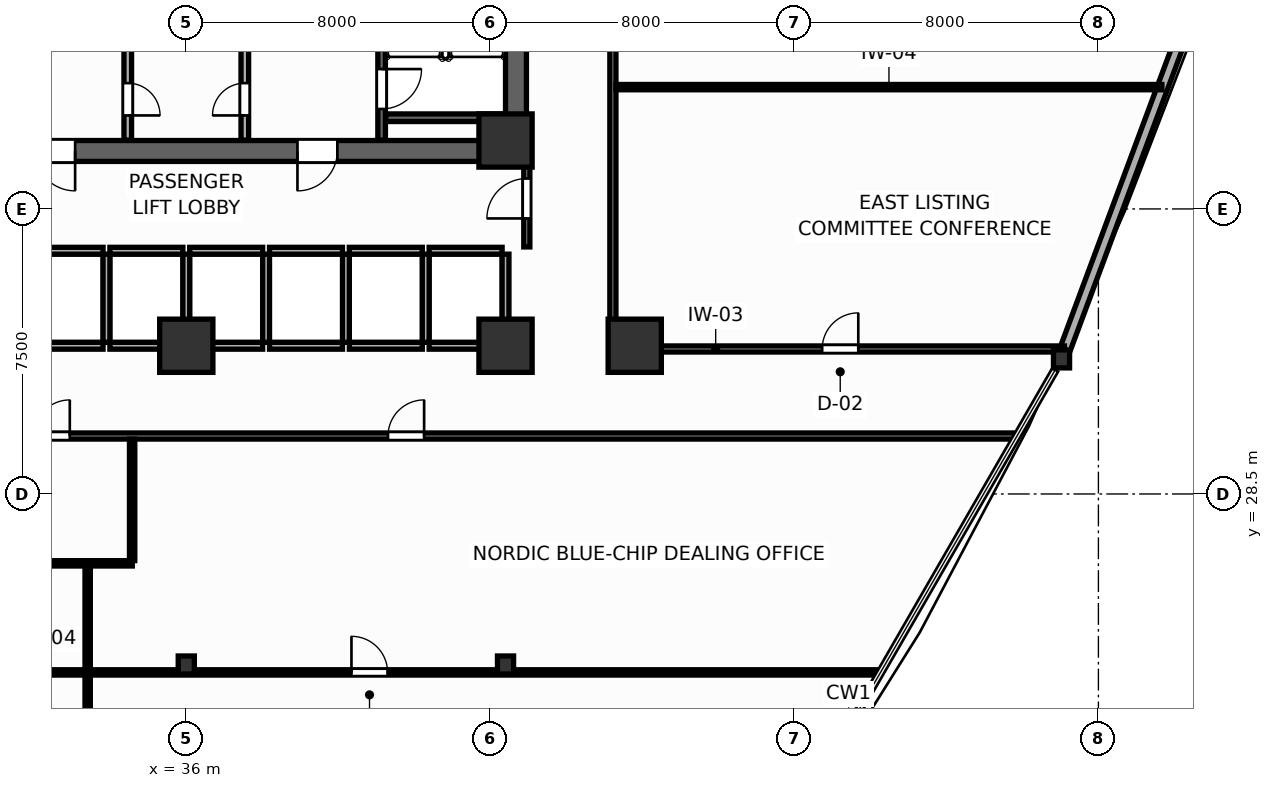
"""IFC4 building model, lengths in metres.
Left out: names, types, materials, properties, quantities, classifications, styles, units other than length and angle.
Written with IfcOpenShell. Run it as: python <this file> out.ifc"""

import sys

from ifc_helpers import new_model, si_unit, direction, frame, frame_2d, origin, origin_2d, place, context, subcontext, project, spatial, rectangle, i_section, extrude, source, transform, mapped, element, fill, save


model = new_model("IFC4")
c1 = context("Model", 3, precision=1e-05, world=origin(), true_north=direction((0.0, 1.0)))
c2 = subcontext(c1, "Body", "Model", "MODEL_VIEW")
j1 = project(units=[si_unit("LENGTHUNIT", "METRE"), si_unit("PLANEANGLEUNIT", "RADIAN")], contexts=[c1])
p1 = place(None, origin())
s1 = spatial("IfcSite", under=j1, at=p1, CompositionType="ELEMENT")
p2 = place(p1, origin())
s2 = spatial("IfcBuilding", under=s1, at=p2, CompositionType="ELEMENT")
p3 = place(p2, frame((0.0, 0.0, 27.9)))
s3 = spatial("IfcBuildingStorey", under=s2, at=p3, CompositionType="ELEMENT", Elevation=27.9)
p4 = place(p3, frame((27.05, 37.525, 0.0), z_axis=(0.0, 0.0, 1.0), x_axis=(1.0, 0.0, 0.0)))
e1 = element("IfcWall", 1, at=p4, inside=s3, PredefinedType="SHEAR", context=c2, shape_type="SweptSolid", body=[
    extrude(rectangle(XDim=17.9, YDim=0.55, at=frame_2d((8.95, 0.0))), origin(), (0.0, 0.0, 1.0), 3.9),
])
p5 = place(p4, frame((4.975, 0.0, 0.0)))
e2 = element("IfcOpeningElement", 2, at=p5, cuts=e1, PredefinedType="OPENING", context=c2, shape_type="SweptSolid", body=[
    extrude(rectangle(XDim=1.05, YDim=2.1, at=frame_2d((0.525, 1.05))), frame((0.0, 0.285, 0.0), z_axis=(0.0, -1.0, 0.0), x_axis=(1.0, 0.0, 0.0)), (0.0, 0.0, 1.0), 0.57),
])
p6 = place(p4, frame((11.875, 0.0, 0.0)))
e3 = element("IfcOpeningElement", 3, at=p6, cuts=e1, PredefinedType="OPENING", context=c2, shape_type="SweptSolid", body=[
    extrude(rectangle(XDim=1.05, YDim=2.1, at=frame_2d((0.525, 1.05))), frame((0.0, 0.285, 0.0), z_axis=(0.0, -1.0, 0.0), x_axis=(1.0, 0.0, 0.0)), (0.0, 0.0, 1.0), 0.57),
])
p7 = place(p3, frame((44.675, 37.8, 0.0), z_axis=(0.0, 0.0, 1.0), x_axis=(0.0, 1.0, 0.0)))
e4 = element("IfcWall", 4, at=p7, inside=s3, PredefinedType="SHEAR", context=c2, shape_type="SweptSolid", body=[
    extrude(rectangle(XDim=9.0, YDim=0.55, at=frame_2d((4.5, 0.0))), origin(), (0.0, 0.0, 1.0), 3.9),
])
m1 = source(origin(), c2, "Body", "SweptSolid", [
    extrude(rectangle(XDim=1.4, YDim=1.4, at=origin_2d()), origin(), (0.0, 0.0, 1.0), 3.9),
])
for number, where, z_axis, x_axis in (
    (5, (44.4, 37.8, 0.0), (0.0, 0.0, 1.0), (1.0, 0.0, 0.0)),
    (6, (44.4, 32.4, 0.0), (0.0, 0.0, 1.0), (1.0, 0.0, 0.0)),
    (7, (36.0, 32.4, 0.0), (0.0, 0.0, 1.0), (1.0, 0.0, 0.0)),
    (8, (47.8, 32.4, 0.0), (0.0, 0.0, 1.0), (1.0, 0.0, 0.0)),
):
    element("IfcColumn", number, at=place(p3, frame(where, z_axis=z_axis, x_axis=x_axis)), inside=s3, PredefinedType="COLUMN", context=c2, shape_type="MappedRepresentation", body=[
        mapped(m1, transform((0.0, 0.0, 0.0), scale=1.0)),
    ])
m2 = source(origin(), c2, "Body", "SweptSolid", [
    extrude(i_section(OverallWidth=0.424, OverallDepth=0.474, WebThickness=0.045, FlangeThickness=0.072, FilletRadius=0.015, at=origin_2d()), origin(), (0.0, 0.0, 1.0), 3.9),
])
for number, where, z_axis, x_axis in (
    (9, (44.4, 24.0, 0.0), (0.0, 0.0, 1.0), (1.0, 0.0, 0.0)),
    (10, (36.0, 24.0, 0.0), (0.0, 0.0, 1.0), (1.0, 0.0, 0.0)),
    (11, (59.03, 32.054, 0.0), (0.0, 0.0, 1.0), (1.0, 0.0, 0.0)),
):
    element("IfcColumn", number, at=place(p3, frame(where, z_axis=z_axis, x_axis=x_axis)), inside=s3, PredefinedType="COLUMN", context=c2, shape_type="MappedRepresentation", body=[
        mapped(m2, transform((0.0, 0.0, 0.0), scale=1.0)),
    ])
p8 = place(p3, frame((59.12, 32.296, 0.0), z_axis=(0.0, 0.0, 1.0), x_axis=(0.348763587367, 0.937210734108, 0.0)))
e12 = element("IfcWall", 12, at=p8, inside=s3, PredefinedType="SOLIDWALL", context=c2, shape_type="SweptSolid", body=[
    extrude(rectangle(XDim=18.863, YDim=0.28, at=frame_2d((9.432, 0.0))), origin(), (0.0, 0.0, 1.0), 3.23),
])
p9 = place(p3, frame((41.14, 37.81, 0.0), z_axis=(0.0, 0.0, 1.0), x_axis=(0.0, 1.0, 0.0)))
e13 = element("IfcWall", 13, at=p9, inside=s3, PredefinedType="SHEAR", context=c2, shape_type="SweptSolid", body=[
    extrude(rectangle(XDim=8.98, YDim=0.2, at=frame_2d((4.49, 0.0))), origin(), (0.0, 0.0, 1.0), 3.9),
])
p10 = place(p9, frame((0.82, 0.0, 0.0)))
e14 = element("IfcOpeningElement", 14, at=p10, cuts=e13, PredefinedType="OPENING", context=c2, shape_type="SweptSolid", body=[
    extrude(rectangle(XDim=1.05, YDim=2.1, at=frame_2d((0.525, 1.05))), frame((0.0, 0.11, 0.0), z_axis=(0.0, -1.0, 0.0), x_axis=(1.0, 0.0, 0.0)), (0.0, 0.0, 1.0), 0.22),
])
p11 = place(p3, frame((41.25, 38.4, 0.0), z_axis=(0.0, 0.0, 1.0), x_axis=(1.0, 0.0, 0.0)))
e15 = element("IfcWall", 15, at=p11, inside=s3, PredefinedType="SHEAR", context=c2, shape_type="SweptSolid", body=[
    extrude(rectangle(XDim=3.14, YDim=0.2, at=frame_2d((1.57, 0.0))), origin(), (0.0, 0.0, 1.0), 3.9),
])
p12 = place(p3, frame((34.46, 37.81, 0.0), z_axis=(0.0, 0.0, 1.0), x_axis=(0.0, 1.0, 0.0)))
e16 = element("IfcWall", 16, at=p12, inside=s3, PredefinedType="PARTITIONING", context=c2, shape_type="SweptSolid", body=[
    extrude(rectangle(XDim=8.98, YDim=0.2, at=frame_2d((4.49, 0.0))), origin(), (0.0, 0.0, 1.0), 3.68),
])
p13 = place(p12, frame((0.65, 0.0, 0.0)))
e17 = element("IfcOpeningElement", 17, at=p13, cuts=e16, PredefinedType="OPENING", context=c2, shape_type="SweptSolid", body=[
    extrude(rectangle(XDim=0.85, YDim=2.05, at=frame_2d((0.425, 1.025))), frame((0.0, 0.11, 0.0), z_axis=(0.0, -1.0, 0.0), x_axis=(1.0, 0.0, 0.0)), (0.0, 0.0, 1.0), 0.22),
])
p14 = place(p3, frame((37.54, 37.81, 0.0), z_axis=(0.0, 0.0, 1.0), x_axis=(0.0, 1.0, 0.0)))
e18 = element("IfcWall", 18, at=p14, inside=s3, PredefinedType="PARTITIONING", context=c2, shape_type="SweptSolid", body=[
    extrude(rectangle(XDim=8.98, YDim=0.2, at=frame_2d((4.49, 0.0))), origin(), (0.0, 0.0, 1.0), 3.68),
])
p15 = place(p14, frame((0.65, 0.0, 0.0)))
e19 = element("IfcOpeningElement", 19, at=p15, cuts=e18, PredefinedType="OPENING", context=c2, shape_type="SweptSolid", body=[
    extrude(rectangle(XDim=0.85, YDim=2.05, at=frame_2d((0.425, 1.025))), frame((0.0, 0.11, 0.0), z_axis=(0.0, -1.0, 0.0), x_axis=(1.0, 0.0, 0.0)), (0.0, 0.0, 1.0), 0.22),
])
p16 = place(p3, frame((31.89, 34.9, 0.0), z_axis=(0.0, 0.0, 1.0), x_axis=(1.0, 0.0, 0.0)))
e20 = element("IfcWall", 20, at=p16, inside=s3, PredefinedType="PARTITIONING", context=c2, shape_type="SweptSolid", body=[
    extrude(rectangle(XDim=1.92, YDim=0.18, at=frame_2d((0.96, 0.0))), origin(), (0.0, 0.0, 1.0), 3.68),
])
p17 = place(p3, frame((31.89, 32.4, 0.0), z_axis=(0.0, 0.0, 1.0), x_axis=(1.0, 0.0, 0.0)))
e21 = element("IfcWall", 21, at=p17, inside=s3, PredefinedType="PARTITIONING", context=c2, shape_type="SweptSolid", body=[
    extrude(rectangle(XDim=1.92, YDim=0.18, at=frame_2d((0.96, 0.0))), origin(), (0.0, 0.0, 1.0), 3.18),
])
p18 = place(p3, frame((33.99, 34.9, 0.0), z_axis=(0.0, 0.0, 1.0), x_axis=(1.0, 0.0, 0.0)))
e22 = element("IfcWall", 22, at=p18, inside=s3, PredefinedType="PARTITIONING", context=c2, shape_type="SweptSolid", body=[
    extrude(rectangle(XDim=1.92, YDim=0.18, at=frame_2d((0.96, 0.0))), origin(), (0.0, 0.0, 1.0), 3.68),
])
p19 = place(p3, frame((33.99, 32.4, 0.0), z_axis=(0.0, 0.0, 1.0), x_axis=(1.0, 0.0, 0.0)))
e23 = element("IfcWall", 23, at=p19, inside=s3, PredefinedType="PARTITIONING", context=c2, shape_type="SweptSolid", body=[
    extrude(rectangle(XDim=1.92, YDim=0.18, at=frame_2d((0.96, 0.0))), origin(), (0.0, 0.0, 1.0), 3.18),
])
p20 = place(p3, frame((33.9, 32.49, 0.0), z_axis=(0.0, 0.0, 1.0), x_axis=(0.0, 1.0, 0.0)))
e24 = element("IfcWall", 24, at=p20, inside=s3, PredefinedType="PARTITIONING", context=c2, shape_type="SweptSolid", body=[
    extrude(rectangle(XDim=2.32, YDim=0.18, at=frame_2d((1.16, 0.0))), origin(), (0.0, 0.0, 1.0), 3.68),
])
p21 = place(p3, frame((36.09, 34.9, 0.0), z_axis=(0.0, 0.0, 1.0), x_axis=(1.0, 0.0, 0.0)))
e25 = element("IfcWall", 25, at=p21, inside=s3, PredefinedType="PARTITIONING", context=c2, shape_type="SweptSolid", body=[
    extrude(rectangle(XDim=1.92, YDim=0.18, at=frame_2d((0.96, 0.0))), origin(), (0.0, 0.0, 1.0), 3.68),
])
p22 = place(p3, frame((36.09, 32.4, 0.0), z_axis=(0.0, 0.0, 1.0), x_axis=(1.0, 0.0, 0.0)))
e26 = element("IfcWall", 26, at=p22, inside=s3, PredefinedType="PARTITIONING", context=c2, shape_type="SweptSolid", body=[
    extrude(rectangle(XDim=1.92, YDim=0.18, at=frame_2d((0.96, 0.0))), origin(), (0.0, 0.0, 1.0), 3.18),
])
p23 = place(p3, frame((36.0, 32.49, 0.0), z_axis=(0.0, 0.0, 1.0), x_axis=(0.0, 1.0, 0.0)))
e27 = element("IfcWall", 27, at=p23, inside=s3, PredefinedType="PARTITIONING", context=c2, shape_type="SweptSolid", body=[
    extrude(rectangle(XDim=2.32, YDim=0.18, at=frame_2d((1.16, 0.0))), origin(), (0.0, 0.0, 1.0), 3.68),
])
p24 = place(p3, frame((38.19, 34.9, 0.0), z_axis=(0.0, 0.0, 1.0), x_axis=(1.0, 0.0, 0.0)))
e28 = element("IfcWall", 28, at=p24, inside=s3, PredefinedType="PARTITIONING", context=c2, shape_type="SweptSolid", body=[
    extrude(rectangle(XDim=1.92, YDim=0.18, at=frame_2d((0.96, 0.0))), origin(), (0.0, 0.0, 1.0), 3.68),
])
p25 = place(p3, frame((38.19, 32.4, 0.0), z_axis=(0.0, 0.0, 1.0), x_axis=(1.0, 0.0, 0.0)))
e29 = element("IfcWall", 29, at=p25, inside=s3, PredefinedType="PARTITIONING", context=c2, shape_type="SweptSolid", body=[
    extrude(rectangle(XDim=1.92, YDim=0.18, at=frame_2d((0.96, 0.0))), origin(), (0.0, 0.0, 1.0), 3.18),
])
p26 = place(p3, frame((38.1, 32.49, 0.0), z_axis=(0.0, 0.0, 1.0), x_axis=(0.0, 1.0, 0.0)))
e30 = element("IfcWall", 30, at=p26, inside=s3, PredefinedType="PARTITIONING", context=c2, shape_type="SweptSolid", body=[
    extrude(rectangle(XDim=2.32, YDim=0.18, at=frame_2d((1.16, 0.0))), origin(), (0.0, 0.0, 1.0), 3.68),
])
p27 = place(p3, frame((40.29, 34.9, 0.0), z_axis=(0.0, 0.0, 1.0), x_axis=(1.0, 0.0, 0.0)))
e31 = element("IfcWall", 31, at=p27, inside=s3, PredefinedType="PARTITIONING", context=c2, shape_type="SweptSolid", body=[
    extrude(rectangle(XDim=1.92, YDim=0.18, at=frame_2d((0.96, 0.0))), origin(), (0.0, 0.0, 1.0), 3.68),
])
p28 = place(p3, frame((40.29, 32.4, 0.0), z_axis=(0.0, 0.0, 1.0), x_axis=(1.0, 0.0, 0.0)))
e32 = element("IfcWall", 32, at=p28, inside=s3, PredefinedType="PARTITIONING", context=c2, shape_type="SweptSolid", body=[
    extrude(rectangle(XDim=1.92, YDim=0.18, at=frame_2d((0.96, 0.0))), origin(), (0.0, 0.0, 1.0), 3.18),
])
p29 = place(p3, frame((40.2, 32.49, 0.0), z_axis=(0.0, 0.0, 1.0), x_axis=(0.0, 1.0, 0.0)))
e33 = element("IfcWall", 33, at=p29, inside=s3, PredefinedType="PARTITIONING", context=c2, shape_type="SweptSolid", body=[
    extrude(rectangle(XDim=2.32, YDim=0.18, at=frame_2d((1.16, 0.0))), origin(), (0.0, 0.0, 1.0), 3.68),
])
p30 = place(p3, frame((42.39, 34.9, 0.0), z_axis=(0.0, 0.0, 1.0), x_axis=(1.0, 0.0, 0.0)))
e34 = element("IfcWall", 34, at=p30, inside=s3, PredefinedType="PARTITIONING", context=c2, shape_type="SweptSolid", body=[
    extrude(rectangle(XDim=1.92, YDim=0.18, at=frame_2d((0.96, 0.0))), origin(), (0.0, 0.0, 1.0), 3.68),
])
p31 = place(p3, frame((42.39, 32.4, 0.0), z_axis=(0.0, 0.0, 1.0), x_axis=(1.0, 0.0, 0.0)))
e35 = element("IfcWall", 35, at=p31, inside=s3, PredefinedType="PARTITIONING", context=c2, shape_type="SweptSolid", body=[
    extrude(rectangle(XDim=1.92, YDim=0.18, at=frame_2d((0.96, 0.0))), origin(), (0.0, 0.0, 1.0), 3.18),
])
for number, where, z_axis, x_axis in (
    (36, (42.3, 32.49, 0.0), (0.0, 0.0, 1.0), (0.0, 1.0, 0.0)),
    (37, (44.4, 32.49, 0.0), (0.0, 0.0, 1.0), (0.0, 1.0, 0.0)),
):
    element("IfcWall", number, at=place(p3, frame(where, z_axis=z_axis, x_axis=x_axis)), inside=s3, PredefinedType="PARTITIONING", context=c2, shape_type="SweptSolid", body=[
        extrude(rectangle(XDim=2.32, YDim=0.18, at=frame_2d((1.16, 0.0))), origin(), (0.0, 0.0, 1.0), 3.68),
    ])
p32 = place(p3, frame((44.96, 35.0, 0.0), z_axis=(0.0, 0.0, 1.0), x_axis=(0.0, 1.0, 0.0)))
e38 = element("IfcWall", 38, at=p32, inside=s3, PredefinedType="PARTITIONING", context=c2, shape_type="SweptSolid", body=[
    extrude(rectangle(XDim=2.65, YDim=0.16, at=frame_2d((1.325, 0.0))), origin(), (0.0, 0.0, 1.0), 3.68),
])
p33 = place(p32, frame((0.75, 0.0, 0.0)))
e39 = element("IfcOpeningElement", 39, at=p33, cuts=e38, PredefinedType="OPENING", context=c2, shape_type="SweptSolid", body=[
    extrude(rectangle(XDim=1.05, YDim=2.1, at=frame_2d((0.525, 1.05))), frame((0.0, 0.09, 0.0), z_axis=(0.0, -1.0, 0.0), x_axis=(1.0, 0.0, 0.0)), (0.0, 0.0, 1.0), 0.18),
])
p34 = place(p3, frame((14.162, 30.025, 0.0), z_axis=(0.0, 0.0, 1.0), x_axis=(1.0, 0.0, 0.0)))
e40 = element("IfcWall", 40, at=p34, inside=s3, PredefinedType="PARTITIONING", context=c2, shape_type="SweptSolid", body=[
    extrude(rectangle(XDim=43.676, YDim=0.16, at=frame_2d((21.838, 0.0))), origin(), (0.0, 0.0, 1.0), 3.68),
])
p35 = place(p34, frame((17.823, 0.0, 0.0)))
e41 = element("IfcOpeningElement", 41, at=p35, cuts=e40, PredefinedType="OPENING", context=c2, shape_type="SweptSolid", body=[
    extrude(rectangle(XDim=0.95, YDim=2.05, at=frame_2d((0.475, 1.025))), frame((0.0, 0.09, 0.0), z_axis=(0.0, -1.0, 0.0), x_axis=(1.0, 0.0, 0.0)), (0.0, 0.0, 1.0), 0.18),
])
p36 = place(p34, frame((6.824, 0.0, 0.0)))
e42 = element("IfcOpeningElement", 42, at=p36, cuts=e40, PredefinedType="OPENING", context=c2, shape_type="SweptSolid", body=[
    extrude(rectangle(XDim=0.95, YDim=2.05, at=frame_2d((0.475, 1.025))), frame((0.0, 0.09, 0.0), z_axis=(0.0, -1.0, 0.0), x_axis=(1.0, 0.0, 0.0)), (0.0, 0.0, 1.0), 0.18),
])
p37 = place(p34, frame((27.146, 0.0, 0.0)))
e43 = element("IfcOpeningElement", 43, at=p37, cuts=e40, PredefinedType="OPENING", context=c2, shape_type="SweptSolid", body=[
    extrude(rectangle(XDim=0.95, YDim=2.05, at=frame_2d((0.475, 1.025))), frame((0.0, 0.09, 0.0), z_axis=(0.0, -1.0, 0.0), x_axis=(1.0, 0.0, 0.0)), (0.0, 0.0, 1.0), 0.18),
])
p38 = place(p3, frame((47.225, 32.31, 0.0), z_axis=(0.0, 0.0, 1.0), x_axis=(0.0, 1.0, 0.0)))
e44 = element("IfcWall", 44, at=p38, inside=s3, PredefinedType="PARTITIONING", context=c2, shape_type="SweptSolid", body=[
    extrude(rectangle(XDim=25.059, YDim=0.16, at=frame_2d((12.529, 0.0))), origin(), (0.0, 0.0, 1.0), 3.68),
])
p39 = place(p38, frame((17.287, 0.0, 0.0)))
e45 = element("IfcOpeningElement", 45, at=p39, cuts=e44, PredefinedType="OPENING", context=c2, shape_type="SweptSolid", body=[
    extrude(rectangle(XDim=0.95, YDim=2.05, at=frame_2d((0.475, 1.025))), frame((0.0, 0.09, 0.0), z_axis=(0.0, -1.0, 0.0), x_axis=(1.0, 0.0, 0.0)), (0.0, 0.0, 1.0), 0.18),
])
p40 = place(p3, frame((47.307, 32.315, 0.0), z_axis=(0.0, 0.0, 1.0), x_axis=(1.0, 0.0, 0.0)))
e46 = element("IfcWall", 46, at=p40, inside=s3, PredefinedType="PARTITIONING", context=c2, shape_type="SweptSolid", body=[
    extrude(rectangle(XDim=11.8, YDim=0.16, at=frame_2d((5.9, 0.0))), origin(), (0.0, 0.0, 1.0), 3.18),
])
p41 = place(p40, frame((5.425, 0.0, 0.0)))
e47 = element("IfcOpeningElement", 47, at=p41, cuts=e46, PredefinedType="OPENING", context=c2, shape_type="SweptSolid", body=[
    extrude(rectangle(XDim=0.95, YDim=2.05, at=frame_2d((0.475, 1.025))), frame((0.0, 0.09, 0.0), z_axis=(0.0, -1.0, 0.0), x_axis=(1.0, 0.0, 0.0)), (0.0, 0.0, 1.0), 0.18),
])
p42 = place(p3, frame((17.753, 23.805, 0.0), z_axis=(0.0, 0.0, 1.0), x_axis=(1.0, 0.0, 0.0)))
e48 = element("IfcWall", 48, at=p42, inside=s3, PredefinedType="PARTITIONING", context=c2, shape_type="SweptSolid", body=[
    extrude(rectangle(XDim=36.494, YDim=0.14, at=frame_2d((18.247, 0.0))), origin(), (0.0, 0.0, 1.0), 3.18),
])
p43 = place(p42, frame((5.704, 0.0, 0.0)))
e49 = element("IfcOpeningElement", 49, at=p43, cuts=e48, PredefinedType="OPENING", context=c2, shape_type="SweptSolid", body=[
    extrude(rectangle(XDim=0.95, YDim=2.05, at=frame_2d((0.475, 1.025))), frame((0.0, 0.08, 0.0), z_axis=(0.0, -1.0, 0.0), x_axis=(1.0, 0.0, 0.0)), (0.0, 0.0, 1.0), 0.16),
])
p44 = place(p42, frame((22.593, 0.0, 0.0)))
e50 = element("IfcOpeningElement", 50, at=p44, cuts=e48, PredefinedType="OPENING", context=c2, shape_type="SweptSolid", body=[
    extrude(rectangle(XDim=0.95, YDim=2.05, at=frame_2d((0.475, 1.025))), frame((0.0, 0.08, 0.0), z_axis=(0.0, -1.0, 0.0), x_axis=(1.0, 0.0, 0.0)), (0.0, 0.0, 1.0), 0.16),
])
p45 = place(p3, frame((33.405, 3.129, 0.0), z_axis=(0.0, 0.0, 1.0), x_axis=(0.0, 1.0, 0.0)))
e51 = element("IfcWall", 51, at=p45, inside=s3, PredefinedType="PARTITIONING", context=c2, shape_type="SweptSolid", body=[
    extrude(rectangle(XDim=23.561, YDim=0.14, at=frame_2d((11.78, 0.0))), origin(), (0.0, 0.0, 1.0), 3.18),
])
p46 = place(p3, frame((47.307, 39.205, 0.0), z_axis=(0.0, 0.0, 1.0), x_axis=(1.0, 0.0, 0.0)))
e52 = element("IfcWall", 52, at=p46, inside=s3, PredefinedType="PARTITIONING", context=c2, shape_type="SweptSolid", body=[
    extrude(rectangle(XDim=14.364, YDim=0.14, at=frame_2d((7.182, 0.0))), origin(), (0.0, 0.0, 1.0), 3.68),
])
p47 = place(p3, frame((30.34, 26.675, 0.0), z_axis=(0.0, 0.0, 1.0), x_axis=(1.0, 0.0, 0.0)))
e53 = element("IfcWall", 53, at=p47, inside=s3, PredefinedType="PARTITIONING", context=c2, shape_type="SweptSolid", body=[
    extrude(rectangle(XDim=4.24, YDim=0.14, at=frame_2d((2.12, 0.0))), origin(), (0.0, 0.0, 1.0), 3.68),
])
p48 = place(p3, frame((34.575, 26.747, 0.0), z_axis=(0.0, 0.0, 1.0), x_axis=(0.0, 1.0, 0.0)))
e54 = element("IfcWall", 54, at=p48, inside=s3, PredefinedType="PARTITIONING", context=c2, shape_type="SweptSolid", body=[
    extrude(rectangle(XDim=3.196, YDim=0.14, at=frame_2d((1.598, 0.0))), origin(), (0.0, 0.0, 1.0), 3.68),
])
p49 = place(p10, frame((1.05, 0.0, 0.0), z_axis=(0.0, 0.0, 1.0), x_axis=(-1.0, 0.0, 0.0)))
e55 = element("IfcDoor", 55, at=p49, inside=s3, OperationType="SINGLE_SWING_LEFT", PredefinedType="DOOR", context=c2, shape_type="SweptSolid", body=[
    extrude(rectangle(XDim=1.05, YDim=2.1, at=frame_2d((0.525, 1.05))), frame((0.0, 0.025, 0.0), z_axis=(0.0, -1.0, 0.0), x_axis=(1.0, 0.0, 0.0)), (0.0, 0.0, 1.0), 0.05),
])
fill(e14, e55)
p50 = place(p13, frame((0.85, 0.0, 0.0), z_axis=(0.0, 0.0, 1.0), x_axis=(-1.0, 0.0, 0.0)))
e56 = element("IfcDoor", 56, at=p50, inside=s3, OperationType="SINGLE_SWING_RIGHT", PredefinedType="DOOR", context=c2, shape_type="SweptSolid", body=[
    extrude(rectangle(XDim=0.85, YDim=2.05, at=frame_2d((0.425, 1.025))), frame((0.0, 0.025, 0.0), z_axis=(0.0, -1.0, 0.0), x_axis=(1.0, 0.0, 0.0)), (0.0, 0.0, 1.0), 0.05),
])
fill(e17, e56)
p51 = place(p15, origin())
e57 = element("IfcDoor", 57, at=p51, inside=s3, OperationType="SINGLE_SWING_LEFT", PredefinedType="DOOR", context=c2, shape_type="SweptSolid", body=[
    extrude(rectangle(XDim=0.85, YDim=2.05, at=frame_2d((0.425, 1.025))), frame((0.0, 0.025, 0.0), z_axis=(0.0, -1.0, 0.0), x_axis=(1.0, 0.0, 0.0)), (0.0, 0.0, 1.0), 0.05),
])
fill(e19, e57)
p52 = place(p33, origin())
e58 = element("IfcDoor", 58, at=p52, inside=s3, OperationType="SINGLE_SWING_LEFT", PredefinedType="DOOR", context=c2, shape_type="SweptSolid", body=[
    extrude(rectangle(XDim=1.05, YDim=2.1, at=frame_2d((0.525, 1.05))), frame((0.0, 0.025, 0.0), z_axis=(0.0, -1.0, 0.0), x_axis=(1.0, 0.0, 0.0)), (0.0, 0.0, 1.0), 0.05),
])
fill(e39, e58)
p53 = place(p35, origin())
e59 = element("IfcDoor", 59, at=p53, inside=s3, OperationType="SINGLE_SWING_RIGHT", PredefinedType="DOOR", context=c2, shape_type="SweptSolid", body=[
    extrude(rectangle(XDim=0.95, YDim=2.05, at=frame_2d((0.475, 1.025))), frame((0.0, 0.025, 0.0), z_axis=(0.0, -1.0, 0.0), x_axis=(1.0, 0.0, 0.0)), (0.0, 0.0, 1.0), 0.05),
])
fill(e41, e59)
p54 = place(p37, origin())
e60 = element("IfcDoor", 60, at=p54, inside=s3, OperationType="SINGLE_SWING_RIGHT", PredefinedType="DOOR", context=c2, shape_type="SweptSolid", body=[
    extrude(rectangle(XDim=0.95, YDim=2.05, at=frame_2d((0.475, 1.025))), frame((0.0, 0.025, 0.0), z_axis=(0.0, -1.0, 0.0), x_axis=(1.0, 0.0, 0.0)), (0.0, 0.0, 1.0), 0.05),
])
fill(e43, e60)
p55 = place(p41, origin())
e61 = element("IfcDoor", 61, at=p55, inside=s3, OperationType="SINGLE_SWING_RIGHT", PredefinedType="DOOR", context=c2, shape_type="SweptSolid", body=[
    extrude(rectangle(XDim=0.95, YDim=2.05, at=frame_2d((0.475, 1.025))), frame((0.0, 0.025, 0.0), z_axis=(0.0, -1.0, 0.0), x_axis=(1.0, 0.0, 0.0)), (0.0, 0.0, 1.0), 0.05),
])
fill(e47, e61)
p56 = place(p44, origin())
e62 = element("IfcDoor", 62, at=p56, inside=s3, OperationType="SINGLE_SWING_LEFT", PredefinedType="DOOR", context=c2, shape_type="SweptSolid", body=[
    extrude(rectangle(XDim=0.95, YDim=2.05, at=frame_2d((0.475, 1.025))), frame((0.0, 0.025, 0.0), z_axis=(0.0, -1.0, 0.0), x_axis=(1.0, 0.0, 0.0)), (0.0, 0.0, 1.0), 0.05),
])
fill(e50, e62)
p57 = place(p5, frame((1.05, 0.0, 0.0), z_axis=(0.0, 0.0, 1.0), x_axis=(-1.0, 0.0, 0.0)))
e63 = element("IfcDoor", 63, at=p57, inside=s3, OperationType="SINGLE_SWING_LEFT", PredefinedType="DOOR", context=c2, shape_type="SweptSolid", body=[
    extrude(rectangle(XDim=1.05, YDim=2.1, at=frame_2d((0.525, 1.05))), frame((0.0, 0.025, 0.0), z_axis=(0.0, -1.0, 0.0), x_axis=(1.0, 0.0, 0.0)), (0.0, 0.0, 1.0), 0.05),
])
fill(e2, e63)
p58 = place(p6, frame((1.05, 0.0, 0.0), z_axis=(0.0, 0.0, 1.0), x_axis=(-1.0, 0.0, 0.0)))
e64 = element("IfcDoor", 64, at=p58, inside=s3, OperationType="SINGLE_SWING_RIGHT", PredefinedType="DOOR", context=c2, shape_type="SweptSolid", body=[
    extrude(rectangle(XDim=1.05, YDim=2.1, at=frame_2d((0.525, 1.05))), frame((0.0, 0.025, 0.0), z_axis=(0.0, -1.0, 0.0), x_axis=(1.0, 0.0, 0.0)), (0.0, 0.0, 1.0), 0.05),
])
fill(e3, e64)
save(model, sys.argv[1])
